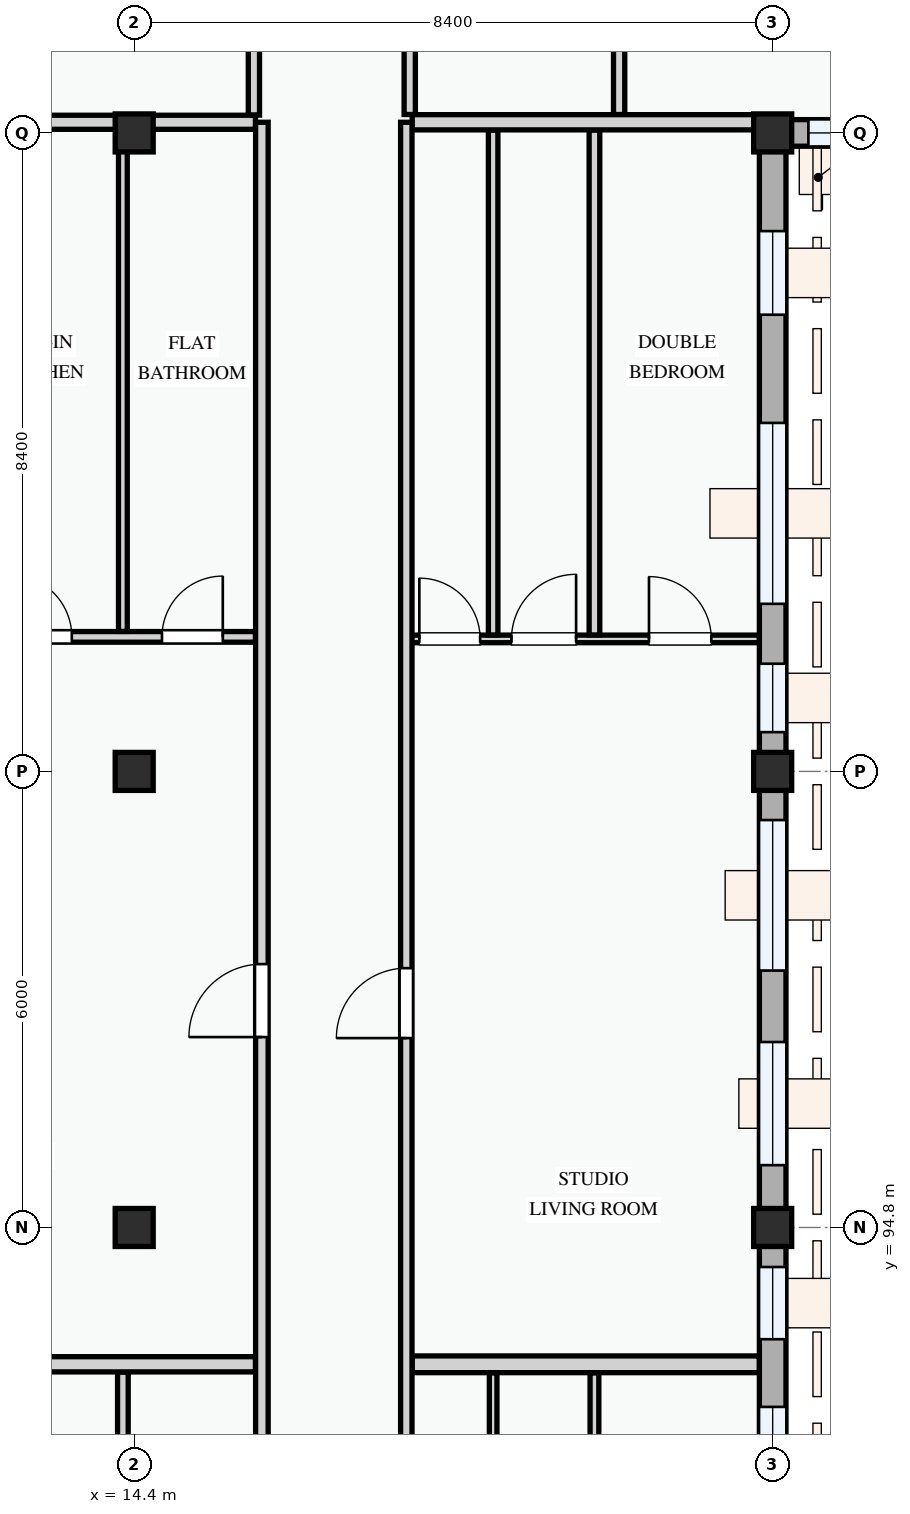
"""IFC4 building model, lengths in metres.
Left out: names, types, materials, properties, quantities, classifications, styles, units other than length and angle.
Written with IfcOpenShell. Run it as: python <this file> out.ifc"""

import sys

from ifc_helpers import new_model, si_unit, direction, frame, frame_2d, origin, origin_2d, place, context, subcontext, project, spatial, rectangle, extrude, element, fill, save


model = new_model("IFC4")
c1 = context("Model", 3, precision=1e-05, world=origin(), true_north=direction((0.0, 1.0)))
c2 = subcontext(c1, "Body", "Model", "MODEL_VIEW")
j1 = project(units=[si_unit("LENGTHUNIT", "METRE"), si_unit("PLANEANGLEUNIT", "RADIAN")], contexts=[c1])
p1 = place(None, origin())
s1 = spatial("IfcSite", under=j1, at=p1, CompositionType="ELEMENT")
p2 = place(p1, origin())
s2 = spatial("IfcBuilding", under=s1, at=p2, CompositionType="ELEMENT")
p3 = place(p2, frame((0.0, 0.0, 47.7)))
s3 = spatial("IfcBuildingStorey", under=s2, at=p3, CompositionType="ELEMENT", Elevation=47.7)
for number, where, z_axis, x_axis in (
    (1, (14.4, 94.8, 0.0), (0.0, 0.0, 1.0), (1.0, 0.0, 0.0)),
    (2, (14.4, 100.8, 0.0), (0.0, 0.0, 1.0), (1.0, 0.0, 0.0)),
    (3, (14.4, 109.2, 0.0), (0.0, 0.0, 1.0), (1.0, 0.0, 0.0)),
    (4, (22.8, 94.8, 0.0), (0.0, 0.0, 1.0), (1.0, 0.0, 0.0)),
    (5, (22.8, 100.8, 0.0), (0.0, 0.0, 1.0), (1.0, 0.0, 0.0)),
    (6, (22.8, 109.2, 0.0), (0.0, 0.0, 1.0), (1.0, 0.0, 0.0)),
):
    element("IfcColumn", number, at=place(p3, frame(where, z_axis=z_axis, x_axis=x_axis)), inside=s3, PredefinedType="COLUMN", context=c2, shape_type="SweptSolid", body=[
        extrude(rectangle(XDim=0.5, YDim=0.5, at=origin_2d()), origin(), (0.0, 0.0, 1.0), 3.3),
    ])
p4 = place(p3, frame((22.8, 109.2, 0.0), z_axis=(0.0, 0.0, 1.0), x_axis=(1.0, 0.0, 0.0)))
e7 = element("IfcWall", 7, at=p4, inside=s3, PredefinedType="STANDARD", context=c2, shape_type="SweptSolid", body=[
    extrude(rectangle(XDim=6.0, YDim=0.35, at=frame_2d((3.0, 0.0))), origin(), (0.0, 0.0, 1.0), 2.525),
])
p5 = place(p4, frame((0.47, 0.0, 0.78)))
e8 = element("IfcOpeningElement", 8, at=p5, cuts=e7, PredefinedType="OPENING", context=c2, shape_type="SweptSolid", body=[
    extrude(rectangle(XDim=1.6, YDim=1.55, at=frame_2d((0.8, 0.775))), frame((0.0, 0.185, 0.0), z_axis=(0.0, -1.0, 0.0), x_axis=(1.0, 0.0, 0.0)), (0.0, 0.0, 1.0), 0.37),
])
p6 = place(p4, frame((3.53, 0.0, 0.78)))
e9 = element("IfcOpeningElement", 9, at=p6, cuts=e7, PredefinedType="OPENING", context=c2, shape_type="SweptSolid", body=[
    extrude(rectangle(XDim=1.1, YDim=1.3, at=frame_2d((0.55, 0.65))), frame((0.0, 0.185, 0.0), z_axis=(0.0, -1.0, 0.0), x_axis=(1.0, 0.0, 0.0)), (0.0, 0.0, 1.0), 0.37),
])
p7 = place(p3, frame((22.8, 86.4, 0.0), z_axis=(0.0, 0.0, 1.0), x_axis=(0.0, 1.0, 0.0)))
e10 = element("IfcWall", 10, at=p7, inside=s3, PredefinedType="STANDARD", context=c2, shape_type="SweptSolid", body=[
    extrude(rectangle(XDim=8.4, YDim=0.35, at=frame_2d((4.2, 0.0))), origin(), (0.0, 0.0, 1.0), 2.425),
])
p8 = place(p7, frame((0.695, 0.0, 0.78)))
e11 = element("IfcOpeningElement", 11, at=p8, cuts=e10, PredefinedType="OPENING", context=c2, shape_type="SweptSolid", body=[
    extrude(rectangle(XDim=2.0, YDim=1.5, at=frame_2d((1.0, 0.75))), frame((0.0, 0.185, 0.0), z_axis=(0.0, -1.0, 0.0), x_axis=(1.0, 0.0, 0.0)), (0.0, 0.0, 1.0), 0.37),
])
p9 = place(p7, frame((3.76, 0.0, 0.78)))
e12 = element("IfcOpeningElement", 12, at=p9, cuts=e10, PredefinedType="OPENING", context=c2, shape_type="SweptSolid", body=[
    extrude(rectangle(XDim=2.28, YDim=1.46, at=frame_2d((1.14, 0.73))), frame((0.0, 0.185, 0.0), z_axis=(0.0, -1.0, 0.0), x_axis=(1.0, 0.0, 0.0)), (0.0, 0.0, 1.0), 0.37),
])
p10 = place(p7, frame((6.93, 0.0, 0.78)))
e13 = element("IfcOpeningElement", 13, at=p10, cuts=e10, PredefinedType="OPENING", context=c2, shape_type="SweptSolid", body=[
    extrude(rectangle(XDim=0.95, YDim=1.15, at=frame_2d((0.475, 0.575))), frame((0.0, 0.185, 0.0), z_axis=(0.0, -1.0, 0.0), x_axis=(1.0, 0.0, 0.0)), (0.0, 0.0, 1.0), 0.37),
])
p11 = place(p3, frame((22.8, 94.8, 0.0), z_axis=(0.0, 0.0, 1.0), x_axis=(0.0, 1.0, 0.0)))
e14 = element("IfcWall", 14, at=p11, inside=s3, PredefinedType="STANDARD", context=c2, shape_type="SweptSolid", body=[
    extrude(rectangle(XDim=6.0, YDim=0.35, at=frame_2d((3.0, 0.0))), origin(), (0.0, 0.0, 1.0), 2.575),
])
p12 = place(p11, frame((0.82, 0.0, 0.78)))
e15 = element("IfcOpeningElement", 15, at=p12, cuts=e14, PredefinedType="OPENING", context=c2, shape_type="SweptSolid", body=[
    extrude(rectangle(XDim=1.62, YDim=1.38, at=frame_2d((0.81, 0.69))), frame((0.0, 0.185, 0.0), z_axis=(0.0, -1.0, 0.0), x_axis=(1.0, 0.0, 0.0)), (0.0, 0.0, 1.0), 0.37),
])
p13 = place(p11, frame((3.38, 0.0, 0.78)))
e16 = element("IfcOpeningElement", 16, at=p13, cuts=e14, PredefinedType="OPENING", context=c2, shape_type="SweptSolid", body=[
    extrude(rectangle(XDim=1.98, YDim=1.5, at=frame_2d((0.99, 0.75))), frame((0.0, 0.185, 0.0), z_axis=(0.0, -1.0, 0.0), x_axis=(1.0, 0.0, 0.0)), (0.0, 0.0, 1.0), 0.37),
])
p14 = place(p3, frame((22.8, 100.8, 0.0), z_axis=(0.0, 0.0, 1.0), x_axis=(0.0, 1.0, 0.0)))
e17 = element("IfcWall", 17, at=p14, inside=s3, PredefinedType="STANDARD", context=c2, shape_type="SweptSolid", body=[
    extrude(rectangle(XDim=8.4, YDim=0.35, at=frame_2d((4.2, 0.0))), origin(), (0.0, 0.0, 1.0), 2.425),
])
p15 = place(p14, frame((0.517, 0.0, 0.78)))
e18 = element("IfcOpeningElement", 18, at=p15, cuts=e17, PredefinedType="OPENING", context=c2, shape_type="SweptSolid", body=[
    extrude(rectangle(XDim=0.9, YDim=1.2, at=frame_2d((0.45, 0.6))), frame((0.0, 0.185, 0.0), z_axis=(0.0, -1.0, 0.0), x_axis=(1.0, 0.0, 0.0)), (0.0, 0.0, 1.0), 0.37),
])
p16 = place(p14, frame((2.205, 0.0, 0.78)))
e19 = element("IfcOpeningElement", 19, at=p16, cuts=e17, PredefinedType="OPENING", context=c2, shape_type="SweptSolid", body=[
    extrude(rectangle(XDim=2.38, YDim=1.48, at=frame_2d((1.19, 0.74))), frame((0.0, 0.185, 0.0), z_axis=(0.0, -1.0, 0.0), x_axis=(1.0, 0.0, 0.0)), (0.0, 0.0, 1.0), 0.37),
])
p17 = place(p14, frame((6.008, 0.0, 0.78)))
e20 = element("IfcOpeningElement", 20, at=p17, cuts=e17, PredefinedType="OPENING", context=c2, shape_type="SweptSolid", body=[
    extrude(rectangle(XDim=1.1, YDim=1.3, at=frame_2d((0.55, 0.65))), frame((0.0, 0.185, 0.0), z_axis=(0.0, -1.0, 0.0), x_axis=(1.0, 0.0, 0.0)), (0.0, 0.0, 1.0), 0.37),
])
p18 = place(p3, frame((15.975, 113.324, 0.0), z_axis=(0.0, 0.0, 1.0), x_axis=(0.0, -1.0, 0.0)))
e21 = element("IfcWall", 21, at=p18, inside=s3, PredefinedType="PARTITIONING", context=c2, shape_type="SweptSolid", body=[
    extrude(rectangle(XDim=3.889, YDim=0.148, at=frame_2d((1.945, 0.0))), origin(), (0.0, 0.0, 1.0), 3.0),
])
for number, where, z_axis, x_axis in (
    (22, (18.025, 113.324, 0.0), (0.0, 0.0, 1.0), (0.0, -1.0, 0.0)),
    (23, (20.78, 113.324, 0.0), (0.0, 0.0, 1.0), (0.0, -1.0, 0.0)),
):
    element("IfcWall", number, at=place(p3, frame(where, z_axis=z_axis, x_axis=x_axis)), inside=s3, PredefinedType="PARTITIONING", context=c2, shape_type="SweptSolid", body=[
        extrude(rectangle(XDim=3.882, YDim=0.148, at=frame_2d((1.941, 0.0))), origin(), (0.0, 0.0, 1.0), 3.0),
    ])
p19 = place(p3, frame((14.251, 89.79, 0.0), z_axis=(0.0, 0.0, 1.0), x_axis=(0.0, 1.0, 0.0)))
e24 = element("IfcWall", 24, at=p19, inside=s3, PredefinedType="PARTITIONING", context=c2, shape_type="SweptSolid", body=[
    extrude(rectangle(XDim=3.108, YDim=0.14, at=frame_2d((1.554, 0.0))), origin(), (0.0, 0.0, 1.0), 2.425),
])
p20 = place(p3, frame((20.455, 89.664, 0.0), z_axis=(0.0, 0.0, 1.0), x_axis=(0.0, 1.0, 0.0)))
e25 = element("IfcWall", 25, at=p20, inside=s3, PredefinedType="PARTITIONING", context=c2, shape_type="SweptSolid", body=[
    extrude(rectangle(XDim=3.224, YDim=0.115, at=frame_2d((1.612, 0.0))), origin(), (0.0, 0.0, 1.0), 3.0),
])
p21 = place(p3, frame((19.122, 89.664, 0.0), z_axis=(0.0, 0.0, 1.0), x_axis=(0.0, 1.0, 0.0)))
e26 = element("IfcWall", 26, at=p21, inside=s3, PredefinedType="PARTITIONING", context=c2, shape_type="SweptSolid", body=[
    extrude(rectangle(XDim=3.224, YDim=0.1, at=frame_2d((1.612, 0.0))), origin(), (0.0, 0.0, 1.0), 3.0),
])
p22 = place(p3, frame((8.577, 102.57, 0.0), z_axis=(0.0, 0.0, 1.0), x_axis=(1.0, 0.0, 0.0)))
e27 = element("IfcWall", 27, at=p22, inside=s3, PredefinedType="PARTITIONING", context=c2, shape_type="SweptSolid", body=[
    extrude(rectangle(XDim=7.419, YDim=0.14, at=frame_2d((3.709, 0.0))), origin(), (0.0, 0.0, 1.0), 3.0),
])
p23 = place(p22, frame((1.287, 0.0, 0.0)))
e28 = element("IfcOpeningElement", 28, at=p23, cuts=e27, PredefinedType="OPENING", context=c2, shape_type="SweptSolid", body=[
    extrude(rectangle(XDim=0.85, YDim=2.1, at=frame_2d((0.425, 1.05))), frame((0.0, 0.08, 0.0), z_axis=(0.0, -1.0, 0.0), x_axis=(1.0, 0.0, 0.0)), (0.0, 0.0, 1.0), 0.16),
])
p24 = place(p22, frame((4.182, 0.0, 0.0)))
e29 = element("IfcOpeningElement", 29, at=p24, cuts=e27, PredefinedType="OPENING", context=c2, shape_type="SweptSolid", body=[
    extrude(rectangle(XDim=0.82, YDim=2.08, at=frame_2d((0.41, 1.04))), frame((0.0, 0.08, 0.0), z_axis=(0.0, -1.0, 0.0), x_axis=(1.0, 0.0, 0.0)), (0.0, 0.0, 1.0), 0.16),
])
p25 = place(p22, frame((6.189, 0.0, 0.0)))
e30 = element("IfcOpeningElement", 30, at=p25, cuts=e27, PredefinedType="OPENING", context=c2, shape_type="SweptSolid", body=[
    extrude(rectangle(XDim=0.8, YDim=2.1, at=frame_2d((0.4, 1.05))), frame((0.0, 0.08, 0.0), z_axis=(0.0, -1.0, 0.0), x_axis=(1.0, 0.0, 0.0)), (0.0, 0.0, 1.0), 0.16),
])
p26 = place(p3, frame((14.251, 102.642, 0.0), z_axis=(0.0, 0.0, 1.0), x_axis=(0.0, 1.0, 0.0)))
e31 = element("IfcWall", 31, at=p26, inside=s3, PredefinedType="PARTITIONING", context=c2, shape_type="SweptSolid", body=[
    extrude(rectangle(XDim=6.604, YDim=0.115, at=frame_2d((3.302, 0.0))), origin(), (0.0, 0.0, 1.0), 2.425),
])
p27 = place(p3, frame((17.98, 102.543, 0.0), z_axis=(0.0, 0.0, 1.0), x_axis=(1.0, 0.0, 0.0)))
e32 = element("IfcWall", 32, at=p27, inside=s3, PredefinedType="PARTITIONING", context=c2, shape_type="SweptSolid", body=[
    extrude(rectangle(XDim=4.643, YDim=0.1, at=frame_2d((2.322, 0.0))), origin(), (0.0, 0.0, 1.0), 3.0),
])
p28 = place(p27, frame((0.171, 0.0, 0.0)))
e33 = element("IfcOpeningElement", 33, at=p28, cuts=e32, PredefinedType="OPENING", context=c2, shape_type="SweptSolid", body=[
    extrude(rectangle(XDim=0.8, YDim=2.1, at=frame_2d((0.4, 1.05))), frame((0.0, 0.06, 0.0), z_axis=(0.0, -1.0, 0.0), x_axis=(1.0, 0.0, 0.0)), (0.0, 0.0, 1.0), 0.12),
])
p29 = place(p27, frame((1.384, 0.0, 0.0)))
e34 = element("IfcOpeningElement", 34, at=p29, cuts=e32, PredefinedType="OPENING", context=c2, shape_type="SweptSolid", body=[
    extrude(rectangle(XDim=0.85, YDim=2.1, at=frame_2d((0.425, 1.05))), frame((0.0, 0.06, 0.0), z_axis=(0.0, -1.0, 0.0), x_axis=(1.0, 0.0, 0.0)), (0.0, 0.0, 1.0), 0.12),
])
p30 = place(p27, frame((3.193, 0.0, 0.0)))
e35 = element("IfcOpeningElement", 35, at=p30, cuts=e32, PredefinedType="OPENING", context=c2, shape_type="SweptSolid", body=[
    extrude(rectangle(XDim=0.82, YDim=2.08, at=frame_2d((0.41, 1.04))), frame((0.0, 0.06, 0.0), z_axis=(0.0, -1.0, 0.0), x_axis=(1.0, 0.0, 0.0)), (0.0, 0.0, 1.0), 0.12),
])
p31 = place(p3, frame((20.455, 102.595, 0.0), z_axis=(0.0, 0.0, 1.0), x_axis=(0.0, 1.0, 0.0)))
e36 = element("IfcWall", 36, at=p31, inside=s3, PredefinedType="PARTITIONING", context=c2, shape_type="SweptSolid", body=[
    extrude(rectangle(XDim=6.643, YDim=0.14, at=frame_2d((3.321, 0.0))), origin(), (0.0, 0.0, 1.0), 3.0),
])
p32 = place(p3, frame((19.122, 102.595, 0.0), z_axis=(0.0, 0.0, 1.0), x_axis=(0.0, 1.0, 0.0)))
e37 = element("IfcWall", 37, at=p32, inside=s3, PredefinedType="PARTITIONING", context=c2, shape_type="SweptSolid", body=[
    extrude(rectangle(XDim=6.643, YDim=0.125, at=frame_2d((3.321, 0.0))), origin(), (0.0, 0.0, 1.0), 3.0),
])
p33 = place(p3, frame((8.577, 93.0, 0.0), z_axis=(0.0, 0.0, 1.0), x_axis=(1.0, 0.0, 0.0)))
e38 = element("IfcWall", 38, at=p33, inside=s3, PredefinedType="PARTITIONING", context=c2, shape_type="SweptSolid", body=[
    extrude(rectangle(XDim=7.419, YDim=0.2, at=frame_2d((3.709, 0.0))), origin(), (0.0, 0.0, 1.0), 3.0),
])
p34 = place(p3, frame((18.057, 93.0, 0.0), z_axis=(0.0, 0.0, 1.0), x_axis=(1.0, 0.0, 0.0)))
e39 = element("IfcWall", 39, at=p34, inside=s3, PredefinedType="PARTITIONING", context=c2, shape_type="SweptSolid", body=[
    extrude(rectangle(XDim=4.566, YDim=0.22, at=frame_2d((2.283, 0.0))), origin(), (0.0, 0.0, 1.0), 3.0),
])
p35 = place(p3, frame((8.577, 109.34, 0.0), z_axis=(0.0, 0.0, 1.0), x_axis=(1.0, 0.0, 0.0)))
e40 = element("IfcWall", 40, at=p35, inside=s3, PredefinedType="PARTITIONING", context=c2, shape_type="SweptSolid", body=[
    extrude(rectangle(XDim=7.419, YDim=0.185, at=frame_2d((3.709, 0.0))), origin(), (0.0, 0.0, 1.0), 2.375),
])
p36 = place(p3, frame((18.057, 109.34, 0.0), z_axis=(0.0, 0.0, 1.0), x_axis=(1.0, 0.0, 0.0)))
e41 = element("IfcWall", 41, at=p36, inside=s3, PredefinedType="PARTITIONING", context=c2, shape_type="SweptSolid", body=[
    extrude(rectangle(XDim=4.683, YDim=0.2, at=frame_2d((2.342, 0.0))), origin(), (0.0, 0.0, 1.0), 2.375),
])
p37 = place(p3, frame((16.08, 86.577, 0.0), z_axis=(0.0, 0.0, 1.0), x_axis=(0.0, 1.0, 0.0)))
e42 = element("IfcWall", 42, at=p37, inside=s3, PredefinedType="PARTITIONING", context=c2, shape_type="SweptSolid", body=[
    extrude(rectangle(XDim=22.763, YDim=0.165, at=frame_2d((11.382, 0.0))), origin(), (0.0, 0.0, 1.0), 3.0),
])
p38 = place(p37, frame((1.943, 0.0, 0.0)))
e43 = element("IfcOpeningElement", 43, at=p38, cuts=e42, PredefinedType="OPENING", context=c2, shape_type="SweptSolid", body=[
    extrude(rectangle(XDim=0.92, YDim=2.1, at=frame_2d((0.46, 1.05))), frame((0.0, 0.093, 0.0), z_axis=(0.0, -1.0, 0.0), x_axis=(1.0, 0.0, 0.0)), (0.0, 0.0, 1.0), 0.185),
])
p39 = place(p37, frame((10.728, 0.0, 0.0)))
e44 = element("IfcOpeningElement", 44, at=p39, cuts=e42, PredefinedType="OPENING", context=c2, shape_type="SweptSolid", body=[
    extrude(rectangle(XDim=0.96, YDim=2.12, at=frame_2d((0.48, 1.06))), frame((0.0, 0.093, 0.0), z_axis=(0.0, -1.0, 0.0), x_axis=(1.0, 0.0, 0.0)), (0.0, 0.0, 1.0), 0.185),
])
p40 = place(p3, frame((17.98, 86.577, 0.0), z_axis=(0.0, 0.0, 1.0), x_axis=(0.0, 1.0, 0.0)))
e45 = element("IfcWall", 45, at=p40, inside=s3, PredefinedType="PARTITIONING", context=c2, shape_type="SweptSolid", body=[
    extrude(rectangle(XDim=22.763, YDim=0.15, at=frame_2d((11.382, 0.0))), origin(), (0.0, 0.0, 1.0), 3.0),
])
p41 = place(p40, frame((1.812, 0.0, 0.0)))
e46 = element("IfcOpeningElement", 46, at=p41, cuts=e45, PredefinedType="OPENING", context=c2, shape_type="SweptSolid", body=[
    extrude(rectangle(XDim=0.92, YDim=2.1, at=frame_2d((0.46, 1.05))), frame((0.0, 0.085, 0.0), z_axis=(0.0, -1.0, 0.0), x_axis=(1.0, 0.0, 0.0)), (0.0, 0.0, 1.0), 0.17),
])
p42 = place(p40, frame((10.715, 0.0, 0.0)))
e47 = element("IfcOpeningElement", 47, at=p42, cuts=e45, PredefinedType="OPENING", context=c2, shape_type="SweptSolid", body=[
    extrude(rectangle(XDim=0.92, YDim=2.1, at=frame_2d((0.46, 1.05))), frame((0.0, 0.085, 0.0), z_axis=(0.0, -1.0, 0.0), x_axis=(1.0, 0.0, 0.0)), (0.0, 0.0, 1.0), 0.17),
])
p43 = place(p5, origin())
e48 = element("IfcWindow", 48, at=p43, inside=s3, PartitioningType="DOUBLE_PANEL_VERTICAL", PredefinedType="WINDOW", context=c2, shape_type="SweptSolid", body=[
    extrude(rectangle(XDim=1.6, YDim=1.55, at=frame_2d((0.8, 0.775))), frame((0.0, 0.03, 0.0), z_axis=(0.0, -1.0, 0.0), x_axis=(1.0, 0.0, 0.0)), (0.0, 0.0, 1.0), 0.06),
])
fill(e8, e48)
p44 = place(p9, origin())
e49 = element("IfcWindow", 49, at=p44, inside=s3, PartitioningType="DOUBLE_PANEL_VERTICAL", PredefinedType="WINDOW", context=c2, shape_type="SweptSolid", body=[
    extrude(rectangle(XDim=2.28, YDim=1.46, at=frame_2d((1.14, 0.73))), frame((0.0, 0.03, 0.0), z_axis=(0.0, -1.0, 0.0), x_axis=(1.0, 0.0, 0.0)), (0.0, 0.0, 1.0), 0.06),
])
fill(e12, e49)
p45 = place(p10, origin())
e50 = element("IfcWindow", 50, at=p45, inside=s3, PartitioningType="SINGLE_PANEL", PredefinedType="WINDOW", context=c2, shape_type="SweptSolid", body=[
    extrude(rectangle(XDim=0.95, YDim=1.15, at=frame_2d((0.475, 0.575))), frame((0.0, 0.03, 0.0), z_axis=(0.0, -1.0, 0.0), x_axis=(1.0, 0.0, 0.0)), (0.0, 0.0, 1.0), 0.06),
])
fill(e13, e50)
p46 = place(p12, origin())
e51 = element("IfcWindow", 51, at=p46, inside=s3, PartitioningType="DOUBLE_PANEL_VERTICAL", PredefinedType="WINDOW", context=c2, shape_type="SweptSolid", body=[
    extrude(rectangle(XDim=1.62, YDim=1.38, at=frame_2d((0.81, 0.69))), frame((0.0, 0.03, 0.0), z_axis=(0.0, -1.0, 0.0), x_axis=(1.0, 0.0, 0.0)), (0.0, 0.0, 1.0), 0.06),
])
fill(e15, e51)
p47 = place(p13, origin())
e52 = element("IfcWindow", 52, at=p47, inside=s3, PartitioningType="DOUBLE_PANEL_VERTICAL", PredefinedType="WINDOW", context=c2, shape_type="SweptSolid", body=[
    extrude(rectangle(XDim=1.98, YDim=1.5, at=frame_2d((0.99, 0.75))), frame((0.0, 0.03, 0.0), z_axis=(0.0, -1.0, 0.0), x_axis=(1.0, 0.0, 0.0)), (0.0, 0.0, 1.0), 0.06),
])
fill(e16, e52)
p48 = place(p15, origin())
e53 = element("IfcWindow", 53, at=p48, inside=s3, PartitioningType="SINGLE_PANEL", PredefinedType="WINDOW", context=c2, shape_type="SweptSolid", body=[
    extrude(rectangle(XDim=0.9, YDim=1.2, at=frame_2d((0.45, 0.6))), frame((0.0, 0.03, 0.0), z_axis=(0.0, -1.0, 0.0), x_axis=(1.0, 0.0, 0.0)), (0.0, 0.0, 1.0), 0.06),
])
fill(e18, e53)
p49 = place(p16, origin())
e54 = element("IfcWindow", 54, at=p49, inside=s3, PartitioningType="DOUBLE_PANEL_VERTICAL", PredefinedType="WINDOW", context=c2, shape_type="SweptSolid", body=[
    extrude(rectangle(XDim=2.38, YDim=1.48, at=frame_2d((1.19, 0.74))), frame((0.0, 0.03, 0.0), z_axis=(0.0, -1.0, 0.0), x_axis=(1.0, 0.0, 0.0)), (0.0, 0.0, 1.0), 0.06),
])
fill(e19, e54)
p50 = place(p17, origin())
e55 = element("IfcWindow", 55, at=p50, inside=s3, PartitioningType="SINGLE_PANEL", PredefinedType="WINDOW", context=c2, shape_type="SweptSolid", body=[
    extrude(rectangle(XDim=1.1, YDim=1.3, at=frame_2d((0.55, 0.65))), frame((0.0, 0.03, 0.0), z_axis=(0.0, -1.0, 0.0), x_axis=(1.0, 0.0, 0.0)), (0.0, 0.0, 1.0), 0.06),
])
fill(e20, e55)
p51 = place(p24, origin())
e56 = element("IfcDoor", 56, at=p51, inside=s3, OperationType="SINGLE_SWING_LEFT", PredefinedType="DOOR", context=c2, shape_type="SweptSolid", body=[
    extrude(rectangle(XDim=0.82, YDim=2.08, at=frame_2d((0.41, 1.04))), frame((0.0, 0.025, 0.0), z_axis=(0.0, -1.0, 0.0), x_axis=(1.0, 0.0, 0.0)), (0.0, 0.0, 1.0), 0.05),
])
fill(e29, e56)
p52 = place(p25, origin())
e57 = element("IfcDoor", 57, at=p52, inside=s3, OperationType="SINGLE_SWING_RIGHT", PredefinedType="DOOR", context=c2, shape_type="SweptSolid", body=[
    extrude(rectangle(XDim=0.8, YDim=2.1, at=frame_2d((0.4, 1.05))), frame((0.0, 0.025, 0.0), z_axis=(0.0, -1.0, 0.0), x_axis=(1.0, 0.0, 0.0)), (0.0, 0.0, 1.0), 0.05),
])
fill(e30, e57)
p53 = place(p28, origin())
e58 = element("IfcDoor", 58, at=p53, inside=s3, OperationType="SINGLE_SWING_LEFT", PredefinedType="DOOR", context=c2, shape_type="SweptSolid", body=[
    extrude(rectangle(XDim=0.8, YDim=2.1, at=frame_2d((0.4, 1.05))), frame((0.0, 0.025, 0.0), z_axis=(0.0, -1.0, 0.0), x_axis=(1.0, 0.0, 0.0)), (0.0, 0.0, 1.0), 0.05),
])
fill(e33, e58)
p54 = place(p29, origin())
e59 = element("IfcDoor", 59, at=p54, inside=s3, OperationType="SINGLE_SWING_RIGHT", PredefinedType="DOOR", context=c2, shape_type="SweptSolid", body=[
    extrude(rectangle(XDim=0.85, YDim=2.1, at=frame_2d((0.425, 1.05))), frame((0.0, 0.025, 0.0), z_axis=(0.0, -1.0, 0.0), x_axis=(1.0, 0.0, 0.0)), (0.0, 0.0, 1.0), 0.05),
])
fill(e34, e59)
p55 = place(p30, origin())
e60 = element("IfcDoor", 60, at=p55, inside=s3, OperationType="SINGLE_SWING_LEFT", PredefinedType="DOOR", context=c2, shape_type="SweptSolid", body=[
    extrude(rectangle(XDim=0.82, YDim=2.08, at=frame_2d((0.41, 1.04))), frame((0.0, 0.025, 0.0), z_axis=(0.0, -1.0, 0.0), x_axis=(1.0, 0.0, 0.0)), (0.0, 0.0, 1.0), 0.05),
])
fill(e35, e60)
p56 = place(p39, origin())
e61 = element("IfcDoor", 61, at=p56, inside=s3, OperationType="SINGLE_SWING_LEFT", PredefinedType="DOOR", context=c2, shape_type="SweptSolid", body=[
    extrude(rectangle(XDim=0.96, YDim=2.12, at=frame_2d((0.48, 1.06))), frame((0.0, 0.025, 0.0), z_axis=(0.0, -1.0, 0.0), x_axis=(1.0, 0.0, 0.0)), (0.0, 0.0, 1.0), 0.05),
])
fill(e44, e61)
p57 = place(p42, origin())
e62 = element("IfcDoor", 62, at=p57, inside=s3, OperationType="SINGLE_SWING_LEFT", PredefinedType="DOOR", context=c2, shape_type="SweptSolid", body=[
    extrude(rectangle(XDim=0.92, YDim=2.1, at=frame_2d((0.46, 1.05))), frame((0.0, 0.025, 0.0), z_axis=(0.0, -1.0, 0.0), x_axis=(1.0, 0.0, 0.0)), (0.0, 0.0, 1.0), 0.05),
])
fill(e47, e62)
save(model, sys.argv[1])
